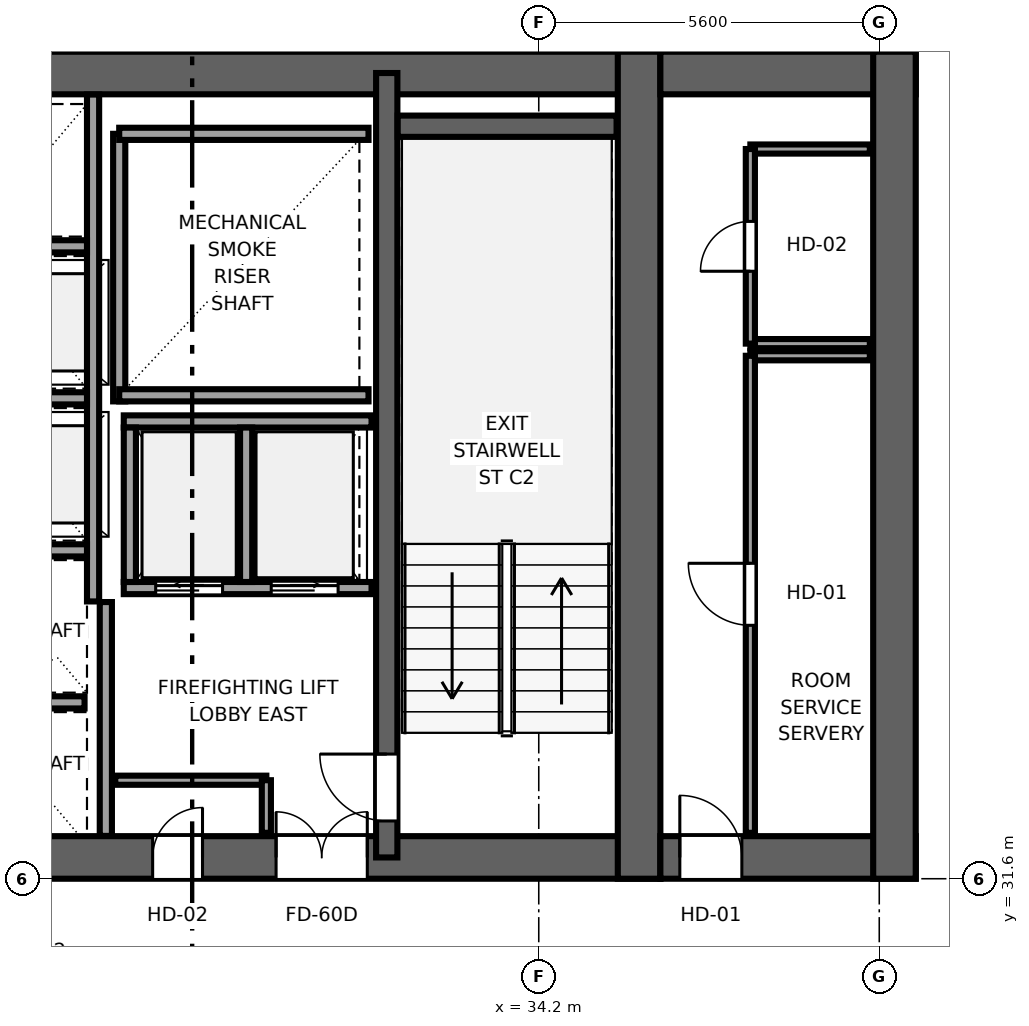
"""IFC4 building model, lengths in metres.
Left out: names, types, materials, properties, quantities, classifications, styles, units other than length and angle.
Written with IfcOpenShell. Run it as: python <this file> out.ifc"""

import sys

from ifc_helpers import new_model, si_unit, direction, frame, frame_2d, origin, place, context, subcontext, project, spatial, rectangle, extrude, source, transform, mapped, element, fill, save


model = new_model("IFC4")
c1 = context("Model", 3, precision=1e-05, world=origin(), true_north=direction((0.0, 1.0)))
c2 = subcontext(c1, "Body", "Model", "MODEL_VIEW")
j1 = project(units=[si_unit("LENGTHUNIT", "METRE"), si_unit("PLANEANGLEUNIT", "RADIAN")], contexts=[c1])
p1 = place(None, origin())
s1 = spatial("IfcSite", under=j1, at=p1, CompositionType="ELEMENT")
p2 = place(p1, origin())
s2 = spatial("IfcBuilding", under=s1, at=p2, CompositionType="ELEMENT")
p3 = place(p2, frame((0.0, 0.0, 136.4)))
s3 = spatial("IfcBuildingStorey", under=s2, at=p3, CompositionType="ELEMENT", Elevation=136.4)
p4 = place(p3, frame((9.8, 31.95, 0.0), z_axis=(0.0, 0.0, 1.0), x_axis=(1.0, 0.0, 0.0)))
e1 = element("IfcWall", 1, at=p4, inside=s3, PredefinedType="SHEAR", context=c2, shape_type="SweptSolid", body=[
    extrude(rectangle(XDim=26.4, YDim=0.7, at=frame_2d((13.2, 0.0))), origin(), (0.0, 0.0, 1.0), 3.55),
])
p5 = place(p4, frame((6.32, 0.0, 0.0), z_axis=(0.0, 0.0, 1.0), x_axis=(-1.0, 0.0, 0.0)))
e2 = element("IfcOpeningElement", 2, at=p5, cuts=e1, PredefinedType="OPENING", context=c2, shape_type="SweptSolid", body=[
    extrude(rectangle(XDim=1.5, YDim=2.04, at=frame_2d((0.75, 1.02))), frame((0.0, 0.36, 0.0), z_axis=(0.0, -1.0, 0.0), x_axis=(1.0, 0.0, 0.0)), (0.0, 0.0, 1.0), 0.72),
])
p6 = place(p4, frame((13.95, 0.0, 0.0), z_axis=(0.0, 0.0, 1.0), x_axis=(-1.0, 0.0, 0.0)))
e3 = element("IfcOpeningElement", 3, at=p6, cuts=e1, PredefinedType="OPENING", context=c2, shape_type="SweptSolid", body=[
    extrude(rectangle(XDim=1.5, YDim=2.04, at=frame_2d((0.75, 1.02))), frame((0.0, 0.36, 0.0), z_axis=(0.0, -1.0, 0.0), x_axis=(1.0, 0.0, 0.0)), (0.0, 0.0, 1.0), 0.72),
])
p7 = place(p4, frame((21.58, 0.0, 0.0), z_axis=(0.0, 0.0, 1.0), x_axis=(-1.0, 0.0, 0.0)))
e4 = element("IfcOpeningElement", 4, at=p7, cuts=e1, PredefinedType="OPENING", context=c2, shape_type="SweptSolid", body=[
    extrude(rectangle(XDim=1.5, YDim=2.04, at=frame_2d((0.75, 1.02))), frame((0.0, 0.36, 0.0), z_axis=(0.0, -1.0, 0.0), x_axis=(1.0, 0.0, 0.0)), (0.0, 0.0, 1.0), 0.72),
])
p8 = place(p4, frame((8.37, 0.0, 0.0), z_axis=(0.0, 0.0, 1.0), x_axis=(-1.0, 0.0, 0.0)))
e5 = element("IfcOpeningElement", 5, at=p8, cuts=e1, PredefinedType="OPENING", context=c2, shape_type="SweptSolid", body=[
    extrude(rectangle(XDim=0.82, YDim=2.01, at=frame_2d((0.41, 1.005))), frame((0.0, 0.36, 0.0), z_axis=(0.0, -1.0, 0.0), x_axis=(1.0, 0.0, 0.0)), (0.0, 0.0, 1.0), 0.72),
])
p9 = place(p4, frame((18.87, 0.0, 0.0), z_axis=(0.0, 0.0, 1.0), x_axis=(-1.0, 0.0, 0.0)))
e6 = element("IfcOpeningElement", 6, at=p9, cuts=e1, PredefinedType="OPENING", context=c2, shape_type="SweptSolid", body=[
    extrude(rectangle(XDim=0.82, YDim=2.01, at=frame_2d((0.41, 1.005))), frame((0.0, 0.36, 0.0), z_axis=(0.0, -1.0, 0.0), x_axis=(1.0, 0.0, 0.0)), (0.0, 0.0, 1.0), 0.72),
])
p10 = place(p3, frame((9.8, 44.85, 0.0), z_axis=(0.0, 0.0, 1.0), x_axis=(1.0, 0.0, 0.0)))
e7 = element("IfcWall", 7, at=p10, inside=s3, PredefinedType="SHEAR", context=c2, shape_type="SweptSolid", body=[
    extrude(rectangle(XDim=26.4, YDim=0.7, at=frame_2d((13.2, 0.0))), origin(), (0.0, 0.0, 1.0), 3.55),
])
p11 = place(p3, frame((35.85, 31.6, 0.0), z_axis=(0.0, 0.0, 1.0), x_axis=(0.0, 1.0, 0.0)))
e8 = element("IfcWall", 8, at=p11, inside=s3, PredefinedType="SHEAR", context=c2, shape_type="SweptSolid", body=[
    extrude(rectangle(XDim=13.6, YDim=0.7, at=frame_2d((6.8, 0.0))), origin(), (0.0, 0.0, 1.0), 3.55),
])
p12 = place(p3, frame((31.7, 31.95, 0.0), z_axis=(0.0, 0.0, 1.0), x_axis=(0.0, 1.0, 0.0)))
e9 = element("IfcWall", 9, at=p12, inside=s3, PredefinedType="SHEAR", context=c2, shape_type="SweptSolid", body=[
    extrude(rectangle(XDim=12.9, YDim=0.35, at=frame_2d((6.45, 0.0))), origin(), (0.0, 0.0, 1.0), 3.55),
])
p13 = place(p12, frame((1.7, 0.0, 0.0), z_axis=(0.0, 0.0, 1.0), x_axis=(-1.0, 0.0, 0.0)))
e10 = element("IfcOpeningElement", 10, at=p13, cuts=e9, PredefinedType="OPENING", context=c2, shape_type="SweptSolid", body=[
    extrude(rectangle(XDim=1.1, YDim=2.12, at=frame_2d((0.55, 1.06))), frame((0.0, 0.185, 0.0), z_axis=(0.0, -1.0, 0.0), x_axis=(1.0, 0.0, 0.0)), (0.0, 0.0, 1.0), 0.37),
])
p14 = place(p3, frame((36.2, 31.95, 0.0), z_axis=(0.0, 0.0, 1.0), x_axis=(1.0, 0.0, 0.0)))
e11 = element("IfcWall", 11, at=p14, inside=s3, PredefinedType="SHEAR", context=c2, shape_type="SweptSolid", body=[
    extrude(rectangle(XDim=4.2, YDim=0.7, at=frame_2d((2.1, 0.0))), origin(), (0.0, 0.0, 1.0), 3.55),
])
p15 = place(p14, frame((1.34, 0.0, 0.0), z_axis=(0.0, 0.0, 1.0), x_axis=(-1.0, 0.0, 0.0)))
e12 = element("IfcOpeningElement", 12, at=p15, cuts=e11, PredefinedType="OPENING", context=c2, shape_type="SweptSolid", body=[
    extrude(rectangle(XDim=1.02, YDim=2.03, at=frame_2d((0.51, 1.015))), frame((0.0, 0.36, 0.0), z_axis=(0.0, -1.0, 0.0), x_axis=(1.0, 0.0, 0.0)), (0.0, 0.0, 1.0), 0.72),
])
p16 = place(p3, frame((36.2, 44.85, 0.0), z_axis=(0.0, 0.0, 1.0), x_axis=(1.0, 0.0, 0.0)))
e13 = element("IfcWall", 13, at=p16, inside=s3, PredefinedType="SHEAR", context=c2, shape_type="SweptSolid", body=[
    extrude(rectangle(XDim=4.2, YDim=0.7, at=frame_2d((2.1, 0.0))), origin(), (0.0, 0.0, 1.0), 3.55),
])
p17 = place(p3, frame((40.05, 31.6, 0.0), z_axis=(0.0, 0.0, 1.0), x_axis=(0.0, 1.0, 0.0)))
e14 = element("IfcWall", 14, at=p17, inside=s3, PredefinedType="SHEAR", context=c2, shape_type="SweptSolid", body=[
    extrude(rectangle(XDim=13.6, YDim=0.7, at=frame_2d((6.8, 0.0))), origin(), (0.0, 0.0, 1.0), 3.55),
])
p18 = place(p3, frame((31.88, 43.975, 0.0), z_axis=(0.0, 0.0, 1.0), x_axis=(1.0, 0.0, 0.0)))
e15 = element("IfcWall", 15, at=p18, inside=s3, PredefinedType="SHEAR", context=c2, shape_type="SweptSolid", body=[
    extrude(rectangle(XDim=3.6, YDim=0.35, at=frame_2d((1.8, 0.0))), origin(), (0.0, 0.0, 1.0), 3.55),
])
p19 = place(p3, frame((27.3, 39.45, 0.0), z_axis=(0.0, 0.0, 1.0), x_axis=(0.0, 1.0, 0.0)))
e16 = element("IfcWall", 16, at=p19, inside=s3, PredefinedType="SOLIDWALL", context=c2, shape_type="SweptSolid", body=[
    extrude(rectangle(XDim=4.4, YDim=0.2, at=frame_2d((2.2, 0.0))), origin(), (0.0, 0.0, 1.0), 3.37),
])
for number, where, z_axis, x_axis in (
    (17, (27.3, 39.55, 0.0), (0.0, 0.0, 1.0), (1.0, 0.0, 0.0)),
    (18, (27.3, 43.85, 0.0), (0.0, 0.0, 1.0), (1.0, 0.0, 0.0)),
):
    element("IfcWall", number, at=place(p3, frame(where, z_axis=z_axis, x_axis=x_axis)), inside=s3, PredefinedType="SOLIDWALL", context=c2, shape_type="SweptSolid", body=[
        extrude(rectangle(XDim=4.1, YDim=0.2, at=frame_2d((2.05, 0.0))), origin(), (0.0, 0.0, 1.0), 3.37),
    ])
p20 = place(p3, frame((27.08, 32.304, 0.0), z_axis=(0.0, 0.0, 1.0), x_axis=(0.0, 1.0, 0.0)))
e19 = element("IfcWall", 19, at=p20, inside=s3, PredefinedType="SOLIDWALL", context=c2, shape_type="SweptSolid", body=[
    extrude(rectangle(XDim=3.846, YDim=0.2, at=frame_2d((1.923, 0.0))), origin(), (0.0, 0.0, 1.0), 3.37),
])
p21 = place(p3, frame((27.375, 36.38, 0.0), z_axis=(0.0, 0.0, 1.0), x_axis=(1.0, 0.0, 0.0)))
e20 = element("IfcWall", 20, at=p21, inside=s3, PredefinedType="SOLIDWALL", context=c2, shape_type="SweptSolid", body=[
    extrude(rectangle(XDim=4.075, YDim=0.2, at=frame_2d((2.038, 0.0))), origin(), (0.0, 0.0, 1.0), 3.37),
])
p22 = place(p21, frame((0.525, 0.0, 0.0)))
e21 = element("IfcOpeningElement", 21, at=p22, cuts=e20, PredefinedType="OPENING", context=c2, shape_type="SweptSolid", body=[
    extrude(rectangle(XDim=1.1, YDim=2.12, at=frame_2d((0.55, 1.06))), frame((0.0, 0.11, 0.0), z_axis=(0.0, -1.0, 0.0), x_axis=(1.0, 0.0, 0.0)), (0.0, 0.0, 1.0), 0.22),
])
p23 = place(p21, frame((2.425, 0.0, 0.0)))
e22 = element("IfcOpeningElement", 22, at=p23, cuts=e20, PredefinedType="OPENING", context=c2, shape_type="SweptSolid", body=[
    extrude(rectangle(XDim=1.1, YDim=2.12, at=frame_2d((0.55, 1.06))), frame((0.0, 0.11, 0.0), z_axis=(0.0, -1.0, 0.0), x_axis=(1.0, 0.0, 0.0)), (0.0, 0.0, 1.0), 0.22),
])
p24 = place(p3, frame((27.375, 39.12, 0.0), z_axis=(0.0, 0.0, 1.0), x_axis=(1.0, 0.0, 0.0)))
e23 = element("IfcWall", 23, at=p24, inside=s3, PredefinedType="SOLIDWALL", context=c2, shape_type="SweptSolid", body=[
    extrude(rectangle(XDim=4.075, YDim=0.2, at=frame_2d((2.038, 0.0))), origin(), (0.0, 0.0, 1.0), 3.37),
])
for number, where, z_axis, x_axis in (
    (24, (27.475, 36.48, 0.0), (0.0, 0.0, 1.0), (0.0, 1.0, 0.0)),
    (25, (29.387, 36.48, 0.0), (0.0, 0.0, 1.0), (0.0, 1.0, 0.0)),
):
    element("IfcWall", number, at=place(p3, frame(where, z_axis=z_axis, x_axis=x_axis)), inside=s3, PredefinedType="SOLIDWALL", context=c2, shape_type="SweptSolid", body=[
        extrude(rectangle(XDim=2.54, YDim=0.2, at=frame_2d((1.27, 0.0))), origin(), (0.0, 0.0, 1.0), 3.37),
    ])
p25 = place(p3, frame((26.87, 36.16, 0.0), z_axis=(0.0, 0.0, 1.0), x_axis=(0.0, 1.0, 0.0)))
e26 = element("IfcWall", 26, at=p25, inside=s3, PredefinedType="SOLIDWALL", context=c2, shape_type="SweptSolid", body=[
    extrude(rectangle(XDim=8.336, YDim=0.2, at=frame_2d((4.168, 0.0))), origin(), (0.0, 0.0, 1.0), 3.37),
])
p26 = place(p3, frame((24.93, 34.5, 0.0), z_axis=(0.0, 0.0, 1.0), x_axis=(1.0, 0.0, 0.0)))
e27 = element("IfcWall", 27, at=p26, inside=s3, PredefinedType="SOLIDWALL", context=c2, shape_type="SweptSolid", body=[
    extrude(rectangle(XDim=1.8, YDim=0.2, at=frame_2d((0.9, 0.0))), origin(), (0.0, 0.0, 1.0), 3.37),
])
for number, where, z_axis, x_axis in (
    (28, (24.93, 37.0, 0.0), (0.0, 0.0, 1.0), (1.0, 0.0, 0.0)),
    (29, (24.93, 39.5, 0.0), (0.0, 0.0, 1.0), (1.0, 0.0, 0.0)),
    (30, (24.93, 42.0, 0.0), (0.0, 0.0, 1.0), (1.0, 0.0, 0.0)),
):
    element("IfcWall", number, at=place(p3, frame(where, z_axis=z_axis, x_axis=x_axis)), inside=s3, PredefinedType="SOLIDWALL", context=c2, shape_type="SweptSolid", body=[
        extrude(rectangle(XDim=1.84, YDim=0.2, at=frame_2d((0.92, 0.0))), origin(), (0.0, 0.0, 1.0), 3.37),
    ])
p27 = place(p3, frame((27.235, 33.22, 0.0), z_axis=(0.0, 0.0, 1.0), x_axis=(1.0, 0.0, 0.0)))
e31 = element("IfcWall", 31, at=p27, inside=s3, PredefinedType="PARTITIONING", context=c2, shape_type="SweptSolid", body=[
    extrude(rectangle(XDim=2.485, YDim=0.15, at=frame_2d((1.242, 0.0))), origin(), (0.0, 0.0, 1.0), 3.37),
])
p28 = place(p3, frame((29.72, 32.355, 0.0), z_axis=(0.0, 0.0, 1.0), x_axis=(0.0, 1.0, 0.0)))
e32 = element("IfcWall", 32, at=p28, inside=s3, PredefinedType="PARTITIONING", context=c2, shape_type="SweptSolid", body=[
    extrude(rectangle(XDim=0.865, YDim=0.15, at=frame_2d((0.433, 0.0))), origin(), (0.0, 0.0, 1.0), 3.37),
])
p29 = place(p3, frame((37.68, 40.2, 0.0), z_axis=(0.0, 0.0, 1.0), x_axis=(1.0, 0.0, 0.0)))
e33 = element("IfcWall", 33, at=p29, inside=s3, PredefinedType="PARTITIONING", context=c2, shape_type="SweptSolid", body=[
    extrude(rectangle(XDim=1.965, YDim=0.15, at=frame_2d((0.982, 0.0))), origin(), (0.0, 0.0, 1.0), 3.37),
])
p30 = place(p3, frame((37.68, 32.355, 0.0), z_axis=(0.0, 0.0, 1.0), x_axis=(0.0, 1.0, 0.0)))
e34 = element("IfcWall", 34, at=p30, inside=s3, PredefinedType="PARTITIONING", context=c2, shape_type="SweptSolid", body=[
    extrude(rectangle(XDim=7.845, YDim=0.15, at=frame_2d((3.922, 0.0))), origin(), (0.0, 0.0, 1.0), 3.37),
])
p31 = place(p30, frame((3.413, 0.0, 0.0)))
e35 = element("IfcOpeningElement", 35, at=p31, cuts=e34, PredefinedType="OPENING", context=c2, shape_type="SweptSolid", body=[
    extrude(rectangle(XDim=1.02, YDim=2.03, at=frame_2d((0.51, 1.015))), frame((0.0, 0.085, 0.0), z_axis=(0.0, -1.0, 0.0), x_axis=(1.0, 0.0, 0.0)), (0.0, 0.0, 1.0), 0.17),
])
for number, where, z_axis, x_axis in (
    (36, (37.68, 40.4, 0.0), (0.0, 0.0, 1.0), (1.0, 0.0, 0.0)),
    (37, (37.68, 43.6, 0.0), (0.0, 0.0, 1.0), (1.0, 0.0, 0.0)),
):
    element("IfcWall", number, at=place(p3, frame(where, z_axis=z_axis, x_axis=x_axis)), inside=s3, PredefinedType="PARTITIONING", context=c2, shape_type="SweptSolid", body=[
        extrude(rectangle(XDim=1.965, YDim=0.15, at=frame_2d((0.982, 0.0))), origin(), (0.0, 0.0, 1.0), 3.37),
    ])
p32 = place(p3, frame((37.68, 40.4, 0.0), z_axis=(0.0, 0.0, 1.0), x_axis=(0.0, 1.0, 0.0)))
e38 = element("IfcWall", 38, at=p32, inside=s3, PredefinedType="PARTITIONING", context=c2, shape_type="SweptSolid", body=[
    extrude(rectangle(XDim=3.2, YDim=0.15, at=frame_2d((1.6, 0.0))), origin(), (0.0, 0.0, 1.0), 3.37),
])
p33 = place(p32, frame((1.19, 0.0, 0.0)))
e39 = element("IfcOpeningElement", 39, at=p33, cuts=e38, PredefinedType="OPENING", context=c2, shape_type="SweptSolid", body=[
    extrude(rectangle(XDim=0.82, YDim=2.01, at=frame_2d((0.41, 1.005))), frame((0.0, 0.085, 0.0), z_axis=(0.0, -1.0, 0.0), x_axis=(1.0, 0.0, 0.0)), (0.0, 0.0, 1.0), 0.17),
])
m1 = source(origin(), c2, "Body", "SweptSolid", [
    extrude(rectangle(XDim=1.1, YDim=2.12, at=frame_2d((0.55, 1.06))), frame((0.0, 0.025, 0.0), z_axis=(0.0, -1.0, 0.0), x_axis=(1.0, 0.0, 0.0)), (0.0, 0.0, 1.0), 0.05),
])
p34 = place(p13, origin())
e40 = element("IfcDoor", 40, at=p34, inside=s3, OperationType="SINGLE_SWING_RIGHT", PredefinedType="DOOR", context=c2, shape_type="MappedRepresentation", body=[
    mapped(m1, transform((0.0, 0.0, 0.0), x_axis=(1.0, 0.0, 0.0), y_axis=(0.0, 1.0, 0.0), z_axis=(0.0, 0.0, 1.0), scale=1.0)),
])
fill(e10, e40)
m2 = source(origin(), c2, "Body", "SweptSolid", [
    extrude(rectangle(XDim=1.5, YDim=2.04, at=frame_2d((0.75, 1.02))), frame((0.0, 0.025, 0.0), z_axis=(0.0, -1.0, 0.0), x_axis=(1.0, 0.0, 0.0)), (0.0, 0.0, 1.0), 0.05),
])
p35 = place(p7, origin())
e41 = element("IfcDoor", 41, at=p35, inside=s3, OperationType="DOUBLE_DOOR_SINGLE_SWING", PredefinedType="DOOR", context=c2, shape_type="MappedRepresentation", body=[
    mapped(m2, transform((0.0, 0.0, 0.0), x_axis=(1.0, 0.0, 0.0), y_axis=(0.0, 1.0, 0.0), z_axis=(0.0, 0.0, 1.0), scale=1.0)),
])
fill(e4, e41)
m3 = source(origin(), c2, "Body", "SweptSolid", [
    extrude(rectangle(XDim=0.82, YDim=2.01, at=frame_2d((0.41, 1.005))), frame((0.0, 0.025, 0.0), z_axis=(0.0, -1.0, 0.0), x_axis=(1.0, 0.0, 0.0)), (0.0, 0.0, 1.0), 0.05),
])
p36 = place(p9, origin())
e42 = element("IfcDoor", 42, at=p36, inside=s3, OperationType="SINGLE_SWING_RIGHT", PredefinedType="DOOR", context=c2, shape_type="MappedRepresentation", body=[
    mapped(m3, transform((0.0, 0.0, 0.0), x_axis=(1.0, 0.0, 0.0), y_axis=(0.0, 1.0, 0.0), z_axis=(0.0, 0.0, 1.0), scale=1.0)),
])
fill(e6, e42)
m4 = source(origin(), c2, "Body", "SweptSolid", [
    extrude(rectangle(XDim=1.02, YDim=2.03, at=frame_2d((0.51, 1.015))), frame((0.0, 0.025, 0.0), z_axis=(0.0, -1.0, 0.0), x_axis=(1.0, 0.0, 0.0)), (0.0, 0.0, 1.0), 0.05),
])
p37 = place(p15, origin())
e43 = element("IfcDoor", 43, at=p37, inside=s3, OperationType="SINGLE_SWING_LEFT", PredefinedType="DOOR", context=c2, shape_type="MappedRepresentation", body=[
    mapped(m4, transform((0.0, 0.0, 0.0), x_axis=(1.0, 0.0, 0.0), y_axis=(0.0, 1.0, 0.0), z_axis=(0.0, 0.0, 1.0), scale=1.0)),
])
fill(e12, e43)
m5 = source(origin(), c2, "Body", "SweptSolid", [
    extrude(rectangle(XDim=1.1, YDim=2.12, at=frame_2d((0.55, 1.06))), frame((0.0, 0.025, 0.0), z_axis=(0.0, -1.0, 0.0), x_axis=(1.0, 0.0, 0.0)), (0.0, 0.0, 1.0), 0.05),
])
p38 = place(p22, origin())
e44 = element("IfcDoor", 44, at=p38, inside=s3, OperationType="SLIDING_TO_LEFT", PredefinedType="DOOR", context=c2, shape_type="MappedRepresentation", body=[
    mapped(m5, transform((0.0, 0.0, 0.0), x_axis=(1.0, 0.0, 0.0), y_axis=(0.0, 1.0, 0.0), z_axis=(0.0, 0.0, 1.0), scale=1.0)),
])
fill(e21, e44)
p39 = place(p23, origin())
e45 = element("IfcDoor", 45, at=p39, inside=s3, OperationType="SLIDING_TO_RIGHT", PredefinedType="DOOR", context=c2, shape_type="MappedRepresentation", body=[
    mapped(m5, transform((0.0, 0.0, 0.0), x_axis=(1.0, 0.0, 0.0), y_axis=(0.0, 1.0, 0.0), z_axis=(0.0, 0.0, 1.0), scale=1.0)),
])
fill(e22, e45)
p40 = place(p31, origin())
e46 = element("IfcDoor", 46, at=p40, inside=s3, OperationType="SINGLE_SWING_RIGHT", PredefinedType="DOOR", context=c2, shape_type="MappedRepresentation", body=[
    mapped(m4, transform((0.0, 0.0, 0.0), x_axis=(1.0, 0.0, 0.0), y_axis=(0.0, 1.0, 0.0), z_axis=(0.0, 0.0, 1.0), scale=1.0)),
])
fill(e35, e46)
p41 = place(p33, origin())
e47 = element("IfcDoor", 47, at=p41, inside=s3, OperationType="SINGLE_SWING_LEFT", PredefinedType="DOOR", context=c2, shape_type="MappedRepresentation", body=[
    mapped(m3, transform((0.0, 0.0, 0.0), x_axis=(1.0, 0.0, 0.0), y_axis=(0.0, 1.0, 0.0), z_axis=(0.0, 0.0, 1.0), scale=1.0)),
])
fill(e39, e47)
save(model, sys.argv[1])
